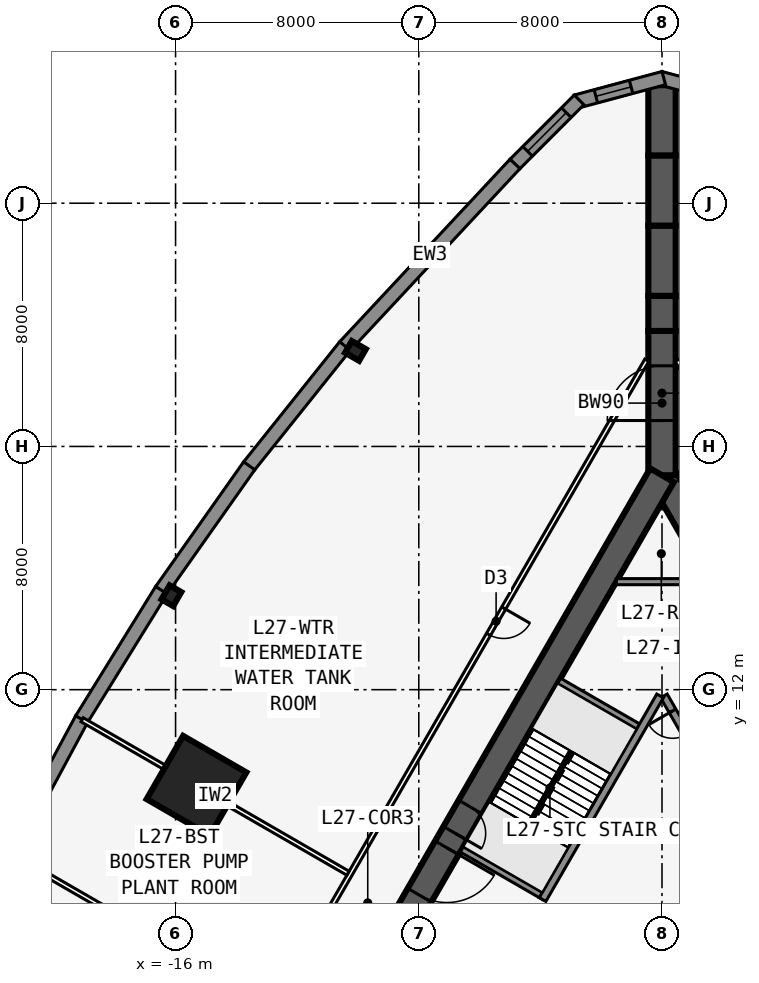
"""IFC4 building model, lengths in metres.
Left out: names, types, materials, properties, quantities, classifications, styles, units other than length and angle.
Written with IfcOpenShell. Run it as: python <this file> out.ifc"""

import sys

from ifc_helpers import new_model, si_unit, direction, frame, frame_2d, origin, origin_2d, place, context, subcontext, project, spatial, polyline, rectangle, i_section, outline, extrude, element, fill, save


model = new_model("IFC4")
c1 = context("Model", 3, precision=1e-05, world=origin(), true_north=direction((0.0, 1.0)))
c2 = subcontext(c1, "Body", "Model", "MODEL_VIEW")
j1 = project(units=[si_unit("LENGTHUNIT", "METRE"), si_unit("PLANEANGLEUNIT", "RADIAN")], contexts=[c1])
p1 = place(None, origin())
s1 = spatial("IfcSite", under=j1, at=p1, CompositionType="ELEMENT")
p2 = place(p1, origin())
s2 = spatial("IfcBuilding", under=s1, at=p2, CompositionType="ELEMENT")
p3 = place(p2, frame((0.0, 0.0, 103.3)))
s3 = spatial("IfcBuildingStorey", under=s2, at=p3, CompositionType="ELEMENT", Elevation=103.3)
p4 = place(p3, frame((16.5, -9.526, 0.0), z_axis=(0.0, 0.0, 1.0), x_axis=(-0.499999749417, 0.866025548458, 0.0)))
e1 = element("IfcWall", 1, at=p4, inside=s3, PredefinedType="SHEAR", context=c2, shape_type="SweptSolid", body=[
    extrude(rectangle(XDim=33.0, YDim=0.9, at=frame_2d((16.5, 0.0))), origin(), (0.0, 0.0, 1.0), 6.4),
])
p5 = place(p4, frame((14.15, 0.0, 0.0)))
e2 = element("IfcOpeningElement", 2, at=p5, cuts=e1, PredefinedType="OPENING", context=c2, shape_type="SweptSolid", body=[
    extrude(rectangle(XDim=1.8, YDim=2.13, at=frame_2d((0.9, 1.065))), frame((0.0, 0.46, 0.0), z_axis=(0.0, -1.0, 0.0), x_axis=(1.0, 0.0, 0.0)), (0.0, 0.0, 1.0), 0.92),
])
p6 = place(p4, frame((12.6, 0.0, 0.0)))
e3 = element("IfcOpeningElement", 3, at=p6, cuts=e1, PredefinedType="OPENING", context=c2, shape_type="SweptSolid", body=[
    extrude(rectangle(XDim=1.0, YDim=2.13, at=frame_2d((0.5, 1.065))), frame((0.0, 0.46, 0.0), z_axis=(0.0, -1.0, 0.0), x_axis=(1.0, 0.0, 0.0)), (0.0, 0.0, 1.0), 0.92),
])
p7 = place(p3, frame((5.379, 2.586, 0.0), z_axis=(0.0, 0.0, 1.0), x_axis=(-0.500001375892, 0.866024609411, 0.0)))
e4 = element("IfcWall", 4, at=p7, inside=s3, PredefinedType="SOLIDWALL", context=c2, shape_type="SweptSolid", body=[
    extrude(rectangle(XDim=10.633, YDim=0.25, at=frame_2d((5.316, 0.0))), origin(), (0.0, 0.0, 1.0), 6.15),
])
p8 = place(p7, frame((9.164, 0.0, 0.0)))
e5 = element("IfcOpeningElement", 5, at=p8, cuts=e4, PredefinedType="OPENING", context=c2, shape_type="SweptSolid", body=[
    extrude(rectangle(XDim=0.9, YDim=2.13, at=frame_2d((0.45, 1.065))), frame((0.0, 0.135, 0.0), z_axis=(0.0, -1.0, 0.0), x_axis=(1.0, 0.0, 0.0)), (0.0, 0.0, 1.0), 0.27),
])
p9 = place(p3, frame((0.0, 19.052, 0.0), z_axis=(0.0, 0.0, 1.0), x_axis=(-0.499999749417, -0.866025548458, 0.0)))
e6 = element("IfcWall", 6, at=p9, inside=s3, PredefinedType="SHEAR", context=c2, shape_type="SweptSolid", body=[
    extrude(rectangle(XDim=33.0, YDim=0.9, at=frame_2d((16.5, 0.0))), origin(), (0.0, 0.0, 1.0), 6.4),
])
p10 = place(p9, frame((14.15, 0.0, 0.0)))
e7 = element("IfcOpeningElement", 7, at=p10, cuts=e6, PredefinedType="OPENING", context=c2, shape_type="SweptSolid", body=[
    extrude(rectangle(XDim=1.8, YDim=2.13, at=frame_2d((0.9, 1.065))), frame((0.0, 0.46, 0.0), z_axis=(0.0, -1.0, 0.0), x_axis=(1.0, 0.0, 0.0)), (0.0, 0.0, 1.0), 0.92),
])
p11 = place(p9, frame((12.6, 0.0, 0.0)))
e8 = element("IfcOpeningElement", 8, at=p11, cuts=e6, PredefinedType="OPENING", context=c2, shape_type="SweptSolid", body=[
    extrude(rectangle(XDim=1.0, YDim=2.13, at=frame_2d((0.5, 1.065))), frame((0.0, 0.46, 0.0), z_axis=(0.0, -1.0, 0.0), x_axis=(1.0, 0.0, 0.0)), (0.0, 0.0, 1.0), 0.92),
])
p12 = place(p3, frame((-0.062, 11.794, 0.0), z_axis=(0.0, 0.0, 1.0), x_axis=(-0.500006680225, -0.86602154692, 0.0)))
e9 = element("IfcWall", 9, at=p12, inside=s3, PredefinedType="SOLIDWALL", context=c2, shape_type="SweptSolid", body=[
    extrude(rectangle(XDim=7.733, YDim=0.25, at=frame_2d((3.866, 0.0))), origin(), (0.0, 0.0, 1.0), 6.15),
])
for number, where, z_axis, x_axis in (
    (10, (-0.679, 10.727, 0.0), (0.0, 0.0, 1.0), (-0.866, 0.5, 0.0)),
    (11, (-3.879, 5.184, 0.0), (0.0, 0.0, 1.0), (-0.866, 0.5, 0.0)),
):
    element("IfcWall", number, at=place(p3, frame(where, z_axis=z_axis, x_axis=x_axis)), inside=s3, PredefinedType="SOLIDWALL", context=c2, shape_type="SweptSolid", body=[
        extrude(rectangle(XDim=3.125, YDim=0.2, at=frame_2d((1.562, 0.0))), origin(), (0.0, 0.0, 1.0), 6.15),
    ])
p13 = place(p3, frame((0.0, 19.052, 0.0), z_axis=(0.0, 0.0, 1.0), x_axis=(0.0, 1.0, 0.0)))
e12 = element("IfcWall", 12, at=p13, inside=s3, PredefinedType="SHEAR", context=c2, shape_type="SweptSolid", body=[
    extrude(rectangle(XDim=4.746, YDim=0.9, at=frame_2d((2.373, 0.0))), origin(), (0.0, 0.0, 1.0), 6.4),
])
p14 = place(p13, frame((1.8, 0.0, 0.0)))
e13 = element("IfcOpeningElement", 13, at=p14, cuts=e12, PredefinedType="OPENING", context=c2, shape_type="SweptSolid", body=[
    extrude(rectangle(XDim=1.8, YDim=2.13, at=frame_2d((0.9, 1.065))), frame((0.0, 0.46, 0.0), z_axis=(0.0, -1.0, 0.0), x_axis=(1.0, 0.0, 0.0)), (0.0, 0.0, 1.0), 0.92),
])
p15 = place(p3, frame((0.0, 23.799, 0.0), z_axis=(0.0, 0.0, 1.0), x_axis=(0.0, 1.0, 0.0)))
e14 = element("IfcWall", 14, at=p15, inside=s3, PredefinedType="SHEAR", context=c2, shape_type="SweptSolid", body=[
    extrude(rectangle(XDim=1.155, YDim=0.9, at=frame_2d((0.577, 0.0))), origin(), (0.0, 0.0, 1.0), 6.4),
])
p16 = place(p3, frame((0.0, 24.953, 0.0), z_axis=(0.0, 0.0, 1.0), x_axis=(0.0, 1.0, 0.0)))
e15 = element("IfcWall", 15, at=p16, inside=s3, PredefinedType="SHEAR", context=c2, shape_type="SweptSolid", body=[
    extrude(rectangle(XDim=2.309, YDim=0.9, at=frame_2d((1.155, 0.0))), origin(), (0.0, 0.0, 1.0), 6.4),
])
p17 = place(p3, frame((0.0, 27.263, 0.0), z_axis=(0.0, 0.0, 1.0), x_axis=(0.0, 1.0, 0.0)))
e16 = element("IfcWall", 16, at=p17, inside=s3, PredefinedType="SHEAR", context=c2, shape_type="SweptSolid", body=[
    extrude(rectangle(XDim=2.31, YDim=0.9, at=frame_2d((1.155, 0.0))), origin(), (0.0, 0.0, 1.0), 6.4),
])
p18 = place(p3, frame((0.0, 29.572, 0.0), z_axis=(0.0, 0.0, 1.0), x_axis=(0.0, 1.0, 0.0)))
e17 = element("IfcWall", 17, at=p18, inside=s3, PredefinedType="SHEAR", context=c2, shape_type="SweptSolid", body=[
    extrude(rectangle(XDim=2.309, YDim=0.9, at=frame_2d((1.155, 0.0))), origin(), (0.0, 0.0, 1.0), 6.4),
])
for number, where, z_axis, x_axis in (
    (18, (-10.083, 23.142, 0.0), (0.0, 0.0, 1.0), (-0.5, -0.866, 0.0)),
    (19, (-16.137, 15.09, 0.0), (0.0, 0.0, 1.0), (-0.866, 0.5, 0.0)),
):
    element("IfcColumn", number, at=place(p3, frame(where, z_axis=z_axis, x_axis=x_axis)), inside=s3, PredefinedType="COLUMN", context=c2, shape_type="SweptSolid", body=[
        extrude(i_section(OverallWidth=0.442, OverallDepth=0.531, WebThickness=0.066, FlangeThickness=0.106, at=origin_2d()), origin(), (0.0, 0.0, 1.0), 6.4),
    ])
p19 = place(p3, frame((-15.312, 8.84, 0.0), z_axis=(0.0, 0.0, 1.0), x_axis=(-0.866025403784, 0.5, 0.0)))
e20 = element("IfcColumn", 20, at=p19, inside=s3, PredefinedType="COLUMN", context=c2, shape_type="SweptSolid", body=[
    extrude(rectangle(XDim=2.4, YDim=2.4, at=origin_2d()), origin(), (0.0, 0.0, 1.0), 6.4),
])
p20 = place(p3, frame((2.829, 31.341, 0.0), z_axis=(0.0, 0.0, 1.0), x_axis=(-0.965930548995, 0.258801419081, 0.0)))
e21 = element("IfcWall", 21, at=p20, inside=s3, PredefinedType="SOLIDWALL", context=c2, shape_type="SweptSolid", body=[
    extrude(outline(polyline([(2.989, 0.225), (2.929, 0.225), (2.438, 0.093), (2.402, 0.225), (0.0, 0.225), (0.0, -0.225), (2.989, -0.225), (2.989, 0.225)])), origin(), (0.0, 0.0, 1.0), 6.15),
])
p21 = place(p20, frame((0.676, 0.0, 1.2)))
e22 = element("IfcOpeningElement", 22, at=p21, cuts=e21, PredefinedType="OPENING", context=c2, shape_type="SweptSolid", body=[
    extrude(rectangle(XDim=1.2, YDim=3.6, at=frame_2d((0.6, 1.8))), frame((0.0, 0.235, 0.0), z_axis=(0.0, -1.0, 0.0), x_axis=(1.0, 0.0, 0.0)), (0.0, 0.0, 1.0), 0.47),
])
p22 = place(p3, frame((0.058, 32.114, 0.0), z_axis=(0.0, 0.0, 1.0), x_axis=(-0.965930548995, -0.258801419081, 0.0)))
e23 = element("IfcWall", 23, at=p22, inside=s3, PredefinedType="SOLIDWALL", context=c2, shape_type="SweptSolid", body=[
    extrude(outline(polyline([(2.989, 0.225), (0.586, 0.225), (0.551, 0.093), (0.059, 0.225), (0.0, 0.225), (0.0, -0.225), (2.989, -0.225), (2.989, 0.225)])), origin(), (0.0, 0.0, 1.0), 6.15),
])
p23 = place(p22, frame((1.113, 0.0, 1.2)))
e24 = element("IfcOpeningElement", 24, at=p23, cuts=e23, PredefinedType="OPENING", context=c2, shape_type="SweptSolid", body=[
    extrude(rectangle(XDim=1.2, YDim=3.6, at=frame_2d((0.6, 1.8))), frame((0.0, 0.235, 0.0), z_axis=(0.0, -1.0, 0.0), x_axis=(1.0, 0.0, 0.0)), (0.0, 0.0, 1.0), 0.47),
])
p24 = place(p3, frame((-2.728, 31.399, 0.0), z_axis=(0.0, 0.0, 1.0), x_axis=(-0.707106781187, -0.707106781187, 0.0)))
e25 = element("IfcWall", 25, at=p24, inside=s3, PredefinedType="SOLIDWALL", context=c2, shape_type="SweptSolid", body=[
    extrude(rectangle(XDim=2.988, YDim=0.45, at=frame_2d((1.494, 0.0))), origin(), (0.0, 0.0, 1.0), 6.15),
])
p25 = place(p24, frame((0.594, 0.0, 1.2)))
e26 = element("IfcOpeningElement", 26, at=p25, cuts=e25, PredefinedType="OPENING", context=c2, shape_type="SweptSolid", body=[
    extrude(rectangle(XDim=1.8, YDim=3.6, at=frame_2d((0.9, 1.8))), frame((0.0, 0.235, 0.0), z_axis=(0.0, -1.0, 0.0), x_axis=(1.0, 0.0, 0.0)), (0.0, 0.0, 1.0), 0.47),
])
p26 = place(p3, frame((-4.835, 29.292, 0.0), z_axis=(0.0, 0.0, 1.0), x_axis=(-0.682290707137, -0.73108097428, 0.0)))
e27 = element("IfcWall", 27, at=p26, inside=s3, PredefinedType="SOLIDWALL", context=c2, shape_type="SweptSolid", body=[
    extrude(outline(polyline([(0.0, 0.0), (8.211, 0.0), (8.211, 6.15), (0.0, 6.15), (0.0, 0.0)]), holes=[polyline([(6.556, 3.075), (6.472, 3.709), (6.227, 4.3), (5.838, 4.807), (5.331, 5.197), (4.74, 5.441), (4.106, 5.525), (3.471, 5.441), (2.881, 5.197), (2.373, 4.807), (1.984, 4.3), (1.739, 3.709), (1.656, 3.075), (1.739, 2.441), (1.984, 1.85), (2.373, 1.343), (2.881, 0.953), (3.471, 0.708), (4.106, 0.625), (4.74, 0.708), (5.331, 0.953), (5.838, 1.343), (6.227, 1.85), (6.472, 2.441), (6.556, 3.075)])]), frame((0.0, 0.225, 0.0), z_axis=(0.0, -1.0, 0.0), x_axis=(1.0, 0.0, 0.0)), (0.0, 0.0, 1.0), 0.45),
])
p27 = place(p3, frame((-10.427, 23.302, 0.0), z_axis=(0.0, 0.0, 1.0), x_axis=(-0.624594965756, -0.780948864364, 0.0)))
e28 = element("IfcWall", 28, at=p27, inside=s3, PredefinedType="SOLIDWALL", context=c2, shape_type="SweptSolid", body=[
    extrude(outline(polyline([(0.0, 0.0), (5.058, 0.0), (5.058, 6.15), (0.0, 6.15), (0.0, 0.0)]), holes=[polyline([(4.429, 3.075), (4.364, 3.567), (4.174, 4.025), (3.872, 4.418), (3.479, 4.72), (3.021, 4.91), (2.529, 4.975), (2.037, 4.91), (1.579, 4.72), (1.185, 4.418), (0.883, 4.025), (0.694, 3.567), (0.629, 3.075), (0.694, 2.583), (0.883, 2.125), (1.185, 1.731), (1.579, 1.429), (2.037, 1.24), (2.529, 1.175), (3.021, 1.24), (3.479, 1.429), (3.872, 1.731), (4.174, 2.125), (4.364, 2.583), (4.429, 3.075)])]), frame((0.0, 0.225, 0.0), z_axis=(0.0, -1.0, 0.0), x_axis=(1.0, 0.0, 0.0)), (0.0, 0.0, 1.0), 0.45),
])
p28 = place(p3, frame((-13.578, 19.363, 0.0), z_axis=(0.0, 0.0, 1.0), x_axis=(-0.5766431066, -0.81699616132, 0.0)))
e29 = element("IfcWall", 29, at=p28, inside=s3, PredefinedType="SOLIDWALL", context=c2, shape_type="SweptSolid", body=[
    extrude(outline(polyline([(0.0, 0.0), (5.021, 0.0), (5.021, 6.15), (0.0, 6.15), (0.0, 0.0)]), holes=[polyline([(4.41, 3.075), (4.346, 3.567), (4.156, 4.025), (3.854, 4.418), (3.46, 4.72), (3.002, 4.91), (2.51, 4.975), (2.019, 4.91), (1.56, 4.72), (1.167, 4.418), (0.865, 4.025), (0.675, 3.567), (0.61, 3.075), (0.675, 2.583), (0.865, 2.125), (1.167, 1.731), (1.56, 1.429), (2.019, 1.24), (2.51, 1.175), (3.002, 1.24), (3.46, 1.429), (3.854, 1.731), (4.156, 2.125), (4.346, 2.583), (4.41, 3.075)])]), frame((0.0, 0.225, 0.0), z_axis=(0.0, -1.0, 0.0), x_axis=(1.0, 0.0, 0.0)), (0.0, 0.0, 1.0), 0.45),
])
p29 = place(p3, frame((-16.466, 15.272, 0.0), z_axis=(0.0, 0.0, 1.0), x_axis=(-0.52611097126, -0.850415925251, 0.0)))
e30 = element("IfcWall", 30, at=p29, inside=s3, PredefinedType="SOLIDWALL", context=c2, shape_type="SweptSolid", body=[
    extrude(outline(polyline([(0.0, 0.0), (5.002, 0.0), (5.002, 6.15), (0.0, 6.15), (0.0, 0.0)]), holes=[polyline([(4.401, 3.075), (4.336, 3.567), (4.146, 4.025), (3.844, 4.418), (3.451, 4.72), (2.993, 4.91), (2.501, 4.975), (2.01, 4.91), (1.551, 4.72), (1.158, 4.418), (0.856, 4.025), (0.666, 3.567), (0.601, 3.075), (0.666, 2.583), (0.856, 2.125), (1.158, 1.731), (1.551, 1.429), (2.01, 1.24), (2.501, 1.175), (2.993, 1.24), (3.451, 1.429), (3.844, 1.731), (4.146, 2.125), (4.336, 2.583), (4.401, 3.075)])]), frame((0.0, 0.225, 0.0), z_axis=(0.0, -1.0, 0.0), x_axis=(1.0, 0.0, 0.0)), (0.0, 0.0, 1.0), 0.45),
])
p30 = place(p3, frame((-19.09, 11.03, 0.0), z_axis=(0.0, 0.0, 1.0), x_axis=(-0.473412820489, -0.880840678782, 0.0)))
e31 = element("IfcWall", 31, at=p30, inside=s3, PredefinedType="SOLIDWALL", context=c2, shape_type="SweptSolid", body=[
    extrude(outline(polyline([(0.0, 0.0), (5.002, 0.0), (5.002, 6.15), (0.0, 6.15), (0.0, 0.0)]), holes=[polyline([(4.401, 3.075), (4.336, 3.567), (4.146, 4.025), (3.845, 4.418), (3.451, 4.72), (2.993, 4.91), (2.501, 4.975), (2.01, 4.91), (1.551, 4.72), (1.158, 4.418), (0.856, 4.025), (0.666, 3.567), (0.601, 3.075), (0.666, 2.583), (0.856, 2.125), (1.158, 1.731), (1.551, 1.429), (2.01, 1.24), (2.501, 1.175), (2.993, 1.24), (3.451, 1.429), (3.845, 1.731), (4.146, 2.125), (4.336, 2.583), (4.401, 3.075)])]), frame((0.0, 0.225, 0.0), z_axis=(0.0, -1.0, 0.0), x_axis=(1.0, 0.0, 0.0)), (0.0, 0.0, 1.0), 0.45),
])
p31 = place(p3, frame((20.027, -10.985, 0.0), z_axis=(0.0, 0.0, 1.0), x_axis=(-0.500001677587, 0.866024435227, 0.0)))
e32 = element("IfcWall", 32, at=p31, inside=s3, PredefinedType="PARTITIONING", context=c2, shape_type="SweptSolid", body=[
    extrude(rectangle(XDim=39.054, YDim=0.15, at=frame_2d((19.527, 0.0))), origin(), (0.0, 0.0, 1.0), 6.15),
])
p32 = place(p31, frame((6.414, 0.0, 0.0)))
e33 = element("IfcOpeningElement", 33, at=p32, cuts=e32, PredefinedType="OPENING", context=c2, shape_type="SweptSolid", body=[
    extrude(rectangle(XDim=1.0, YDim=2.13, at=frame_2d((0.5, 1.065))), frame((0.0, 0.085, 0.0), z_axis=(0.0, -1.0, 0.0), x_axis=(1.0, 0.0, 0.0)), (0.0, 0.0, 1.0), 0.17),
])
p33 = place(p31, frame((17.527, 0.0, 0.0)))
e34 = element("IfcOpeningElement", 34, at=p33, cuts=e32, PredefinedType="OPENING", context=c2, shape_type="SweptSolid", body=[
    extrude(rectangle(XDim=1.0, YDim=2.13, at=frame_2d((0.5, 1.065))), frame((0.0, 0.085, 0.0), z_axis=(0.0, -1.0, 0.0), x_axis=(1.0, 0.0, 0.0)), (0.0, 0.0, 1.0), 0.17),
])
p34 = place(p31, frame((30.14, 0.0, 0.0)))
e35 = element("IfcOpeningElement", 35, at=p34, cuts=e32, PredefinedType="OPENING", context=c2, shape_type="SweptSolid", body=[
    extrude(rectangle(XDim=1.0, YDim=2.13, at=frame_2d((0.5, 1.065))), frame((0.0, 0.085, 0.0), z_axis=(0.0, -1.0, 0.0), x_axis=(1.0, 0.0, 0.0)), (0.0, 0.0, 1.0), 0.17),
])
p35 = place(p3, frame((-0.5, 22.836, 0.0), z_axis=(0.0, 0.0, 1.0), x_axis=(-0.500001677587, -0.866024435227, 0.0)))
e36 = element("IfcWall", 36, at=p35, inside=s3, PredefinedType="PARTITIONING", context=c2, shape_type="SweptSolid", body=[
    extrude(rectangle(XDim=39.054, YDim=0.15, at=frame_2d((19.527, 0.0))), origin(), (0.0, 0.0, 1.0), 6.15),
])
p36 = place(p35, frame((9.414, 0.0, 0.0)))
e37 = element("IfcOpeningElement", 37, at=p36, cuts=e36, PredefinedType="OPENING", context=c2, shape_type="SweptSolid", body=[
    extrude(rectangle(XDim=1.0, YDim=2.13, at=frame_2d((0.5, 1.065))), frame((0.0, 0.085, 0.0), z_axis=(0.0, -1.0, 0.0), x_axis=(1.0, 0.0, 0.0)), (0.0, 0.0, 1.0), 0.17),
])
p37 = place(p35, frame((21.527, 0.0, 0.0)))
e38 = element("IfcOpeningElement", 38, at=p37, cuts=e36, PredefinedType="OPENING", context=c2, shape_type="SweptSolid", body=[
    extrude(rectangle(XDim=1.0, YDim=2.13, at=frame_2d((0.5, 1.065))), frame((0.0, 0.085, 0.0), z_axis=(0.0, -1.0, 0.0), x_axis=(1.0, 0.0, 0.0)), (0.0, 0.0, 1.0), 0.17),
])
p38 = place(p35, frame((31.14, 0.0, 0.0)))
e39 = element("IfcOpeningElement", 39, at=p38, cuts=e36, PredefinedType="OPENING", context=c2, shape_type="SweptSolid", body=[
    extrude(rectangle(XDim=1.0, YDim=2.13, at=frame_2d((0.5, 1.065))), frame((0.0, 0.085, 0.0), z_axis=(0.0, -1.0, 0.0), x_axis=(1.0, 0.0, 0.0)), (0.0, 0.0, 1.0), 0.17),
])
p39 = place(p3, frame((-10.329, 5.963, 0.0), z_axis=(0.0, 0.0, 1.0), x_axis=(-0.866021688545, 0.500006434927, 0.0)))
e40 = element("IfcWall", 40, at=p39, inside=s3, PredefinedType="PARTITIONING", context=c2, shape_type="SweptSolid", body=[
    extrude(rectangle(XDim=10.096, YDim=0.15, at=frame_2d((5.048, 0.0))), origin(), (0.0, 0.0, 1.0), 5.109),
])
p40 = place(p3, frame((-12.829, 1.633, 0.0), z_axis=(0.0, 0.0, 1.0), x_axis=(-0.866026934769, 0.499997348248, 0.0)))
e41 = element("IfcWall", 41, at=p40, inside=s3, PredefinedType="PARTITIONING", context=c2, shape_type="SweptSolid", body=[
    extrude(rectangle(XDim=9.943, YDim=0.15, at=frame_2d((4.971, 0.0))), origin(), (0.0, 0.0, 1.0), 4.75),
])
p41 = place(p3, frame((-1.501, 15.552, 0.0), z_axis=(0.0, 0.0, 1.0), x_axis=(1.0, 0.0, 0.0)))
e42 = element("IfcWall", 42, at=p41, inside=s3, PredefinedType="SOLIDWALL", context=c2, shape_type="SweptSolid", body=[
    extrude(rectangle(XDim=3.002, YDim=0.2, at=frame_2d((1.501, 0.0))), origin(), (0.0, 0.0, 1.0), 6.15),
])
p42 = place(p3, frame((-2.988, 9.978, 0.0), z_axis=(0.0, 0.0, 1.0), x_axis=(-0.499992232847, -0.866029888106, 0.0)))
e43 = element("IfcWall", 43, at=p42, inside=s3, PredefinedType="SOLIDWALL", context=c2, shape_type="SweptSolid", body=[
    extrude(rectangle(XDim=2.794, YDim=0.1, at=frame_2d((1.397, 0.0))), origin(), (0.0, 0.0, 1.0), 6.4),
])
p43 = place(p23, origin())
e44 = element("IfcWindow", 44, at=p43, inside=s3, PartitioningType="SINGLE_PANEL", PredefinedType="WINDOW", context=c2, shape_type="SweptSolid", body=[
    extrude(rectangle(XDim=1.2, YDim=3.6, at=frame_2d((0.6, 1.8))), frame((0.0, 0.03, 0.0), z_axis=(0.0, -1.0, 0.0), x_axis=(1.0, 0.0, 0.0)), (0.0, 0.0, 1.0), 0.06),
])
fill(e24, e44)
p44 = place(p25, origin())
e45 = element("IfcWindow", 45, at=p44, inside=s3, PartitioningType="SINGLE_PANEL", PredefinedType="WINDOW", context=c2, shape_type="SweptSolid", body=[
    extrude(rectangle(XDim=1.8, YDim=3.6, at=frame_2d((0.9, 1.8))), frame((0.0, 0.03, 0.0), z_axis=(0.0, -1.0, 0.0), x_axis=(1.0, 0.0, 0.0)), (0.0, 0.0, 1.0), 0.06),
])
fill(e26, e45)
p45 = place(p36, origin())
e46 = element("IfcDoor", 46, at=p45, inside=s3, OperationType="SINGLE_SWING_LEFT", PredefinedType="DOOR", context=c2, shape_type="SweptSolid", body=[
    extrude(rectangle(XDim=1.0, YDim=2.13, at=frame_2d((0.5, 1.065))), frame((0.0, 0.025, 0.0), z_axis=(0.0, -1.0, 0.0), x_axis=(1.0, 0.0, 0.0)), (0.0, 0.0, 1.0), 0.05),
])
fill(e37, e46)
p46 = place(p10, origin())
e47 = element("IfcDoor", 47, at=p46, inside=s3, OperationType="DOUBLE_DOOR_SINGLE_SWING", PredefinedType="DOOR", context=c2, shape_type="SweptSolid", body=[
    extrude(rectangle(XDim=1.8, YDim=2.13, at=frame_2d((0.9, 1.065))), frame((0.0, 0.025, 0.0), z_axis=(0.0, -1.0, 0.0), x_axis=(1.0, 0.0, 0.0)), (0.0, 0.0, 1.0), 0.05),
])
fill(e7, e47)
p47 = place(p11, origin())
e48 = element("IfcDoor", 48, at=p47, inside=s3, OperationType="SINGLE_SWING_RIGHT", PredefinedType="DOOR", context=c2, shape_type="SweptSolid", body=[
    extrude(rectangle(XDim=1.0, YDim=2.13, at=frame_2d((0.5, 1.065))), frame((0.0, 0.025, 0.0), z_axis=(0.0, -1.0, 0.0), x_axis=(1.0, 0.0, 0.0)), (0.0, 0.0, 1.0), 0.05),
])
fill(e8, e48)
p48 = place(p14, origin())
e49 = element("IfcDoor", 49, at=p48, inside=s3, OperationType="DOUBLE_DOOR_DOUBLE_SWING", PredefinedType="DOOR", context=c2, shape_type="SweptSolid", body=[
    extrude(rectangle(XDim=1.8, YDim=2.13, at=frame_2d((0.9, 1.065))), frame((0.0, 0.025, 0.0), z_axis=(0.0, -1.0, 0.0), x_axis=(1.0, 0.0, 0.0)), (0.0, 0.0, 1.0), 0.05),
])
fill(e13, e49)
p49 = place(p8, origin())
e50 = element("IfcDoor", 50, at=p49, inside=s3, OperationType="SINGLE_SWING_RIGHT", PredefinedType="DOOR", context=c2, shape_type="SweptSolid", body=[
    extrude(rectangle(XDim=0.9, YDim=2.13, at=frame_2d((0.45, 1.065))), frame((0.0, 0.025, 0.0), z_axis=(0.0, -1.0, 0.0), x_axis=(1.0, 0.0, 0.0)), (0.0, 0.0, 1.0), 0.05),
])
fill(e5, e50)
save(model, sys.argv[1])
